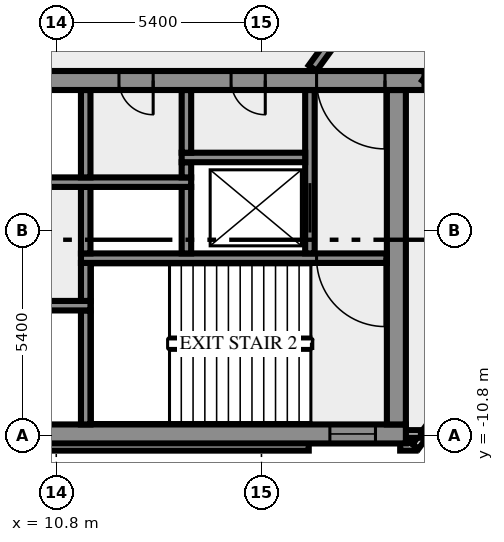
"""IFC4 building model, lengths in metres.
Left out: names, types, materials, properties, quantities, classifications, styles, units other than length and angle.
Written with IfcOpenShell. Run it as: python <this file> out.ifc"""

import sys

from ifc_helpers import new_model, si_unit, direction, frame, frame_2d, origin, place, context, subcontext, project, spatial, rectangle, extrude, element, fill, save


model = new_model("IFC4")
c1 = context("Model", 3, precision=1e-05, world=origin(), true_north=direction((0.0, 1.0)))
c2 = subcontext(c1, "Body", "Model", "MODEL_VIEW")
j1 = project(units=[si_unit("LENGTHUNIT", "METRE"), si_unit("PLANEANGLEUNIT", "RADIAN")], contexts=[c1])
p1 = place(None, origin())
s1 = spatial("IfcSite", under=j1, at=p1, CompositionType="ELEMENT")
p2 = place(p1, origin())
s2 = spatial("IfcBuilding", under=s1, at=p2, CompositionType="ELEMENT")
p3 = place(p2, frame((0.0, 0.0, 109.0)))
s3 = spatial("IfcBuildingStorey", under=s2, at=p3, CompositionType="ELEMENT", Elevation=109.0)
p4 = place(p3, frame((-17.444, -11.088, 0.0), z_axis=(0.0, 0.0, 1.0), x_axis=(1.0, 0.0, 0.0)))
e1 = element("IfcWall", 1, at=p4, inside=s3, PredefinedType="SOLIDWALL", context=c2, shape_type="SweptSolid", body=[
    extrude(rectangle(XDim=34.888, YDim=0.2, at=frame_2d((17.444, 0.0))), origin(), (0.0, 0.0, 1.0), 3.65),
])
p5 = place(p3, frame((19.85, -11.088, 0.0), z_axis=(0.0, 0.0, 1.0), x_axis=(1.0, 0.0, 0.0)))
e2 = element("IfcWall", 2, at=p5, inside=s3, PredefinedType="SOLIDWALL", context=c2, shape_type="SweptSolid", body=[
    extrude(rectangle(XDim=0.406, YDim=0.2, at=frame_2d((0.203, 0.0))), origin(), (0.0, 0.0, 1.0), 3.65),
])
p6 = place(p3, frame((20.253, -11.083, 0.0), z_axis=(0.0, 0.0, 1.0), x_axis=(0.587766567315, 0.809030569476, 0.0)))
e3 = element("IfcWall", 3, at=p6, inside=s3, PredefinedType="SOLIDWALL", context=c2, shape_type="SweptSolid", body=[
    extrude(rectangle(XDim=2.688, YDim=0.2, at=frame_2d((1.344, 0.0))), origin(), (0.0, 0.0, 1.0), 3.65),
])
p7 = place(p3, frame((19.98, -10.75, 0.0), z_axis=(0.0, 0.0, 1.0), x_axis=(1.0, 0.0, 0.0)))
e4 = element("IfcWall", 4, at=p7, inside=s3, PredefinedType="SOLIDWALL", context=c2, shape_type="SweptSolid", body=[
    extrude(rectangle(XDim=0.417, YDim=0.2, at=frame_2d((0.208, 0.0))), origin(), (0.0, 0.0, 1.0), 3.65),
])
p8 = place(p3, frame((-20.0, -10.75, 0.0), z_axis=(0.0, 0.0, 1.0), x_axis=(1.0, 0.0, 0.0)))
e5 = element("IfcWall", 5, at=p8, inside=s3, PredefinedType="SHEAR", context=c2, shape_type="SweptSolid", body=[
    extrude(rectangle(XDim=40.0, YDim=0.5, at=frame_2d((20.0, 0.0))), origin(), (0.0, 0.0, 1.0), 3.65),
])
p9 = place(p8, frame((0.8, 0.0, 1.0)))
e6 = element("IfcOpeningElement", 6, at=p9, cuts=e5, PredefinedType="OPENING", context=c2, shape_type="SweptSolid", body=[
    extrude(rectangle(XDim=1.2, YDim=1.2, at=frame_2d((0.6, 0.6))), frame((0.0, 0.26, 0.0), z_axis=(0.0, -1.0, 0.0), x_axis=(1.0, 0.0, 0.0)), (0.0, 0.0, 1.0), 0.52),
])
p10 = place(p8, frame((38.0, 0.0, 1.0)))
e7 = element("IfcOpeningElement", 7, at=p10, cuts=e5, PredefinedType="OPENING", context=c2, shape_type="SweptSolid", body=[
    extrude(rectangle(XDim=1.2, YDim=1.2, at=frame_2d((0.6, 0.6))), frame((0.0, 0.26, 0.0), z_axis=(0.0, -1.0, 0.0), x_axis=(1.0, 0.0, 0.0)), (0.0, 0.0, 1.0), 0.52),
])
p11 = place(p3, frame((11.575, -10.5, 0.0), z_axis=(0.0, 0.0, 1.0), x_axis=(0.0, 1.0, 0.0)))
e8 = element("IfcWall", 8, at=p11, inside=s3, PredefinedType="SHEAR", context=c2, shape_type="SweptSolid", body=[
    extrude(rectangle(XDim=3.0, YDim=0.25, at=frame_2d((1.5, 0.0))), origin(), (0.0, 0.0, 1.0), 3.65),
])
p12 = place(p3, frame((19.75, -10.5, 0.0), z_axis=(0.0, 0.0, 1.0), x_axis=(0.0, 1.0, 0.0)))
e9 = element("IfcWall", 9, at=p12, inside=s3, PredefinedType="SHEAR", context=c2, shape_type="SweptSolid", body=[
    extrude(rectangle(XDim=8.8, YDim=0.5, at=frame_2d((4.4, 0.0))), origin(), (0.0, 0.0, 1.0), 3.65),
])
p13 = place(p3, frame((11.7, -7.375, 0.0), z_axis=(0.0, 0.0, 1.0), x_axis=(-1.0, 0.0, 0.0)))
e10 = element("IfcWall", 10, at=p13, inside=s3, PredefinedType="SHEAR", context=c2, shape_type="SweptSolid", body=[
    extrude(rectangle(XDim=23.4, YDim=0.25, at=frame_2d((11.7, 0.0))), origin(), (0.0, 0.0, 1.0), 3.65),
])
p14 = place(p13, frame((21.45, 0.0, 0.0)))
e11 = element("IfcOpeningElement", 11, at=p14, cuts=e10, PredefinedType="OPENING", context=c2, shape_type="SweptSolid", body=[
    extrude(rectangle(XDim=1.1, YDim=2.1, at=frame_2d((0.55, 1.05))), frame((0.0, 0.135, 0.0), z_axis=(0.0, -1.0, 0.0), x_axis=(1.0, 0.0, 0.0)), (0.0, 0.0, 1.0), 0.27),
])
p15 = place(p13, frame((18.95, 0.0, 0.0)))
e12 = element("IfcOpeningElement", 12, at=p15, cuts=e10, PredefinedType="OPENING", context=c2, shape_type="SweptSolid", body=[
    extrude(rectangle(XDim=1.1, YDim=2.1, at=frame_2d((0.55, 1.05))), frame((0.0, 0.135, 0.0), z_axis=(0.0, -1.0, 0.0), x_axis=(1.0, 0.0, 0.0)), (0.0, 0.0, 1.0), 0.27),
])
p16 = place(p13, frame((16.45, 0.0, 0.0)))
e13 = element("IfcOpeningElement", 13, at=p16, cuts=e10, PredefinedType="OPENING", context=c2, shape_type="SweptSolid", body=[
    extrude(rectangle(XDim=1.1, YDim=2.1, at=frame_2d((0.55, 1.05))), frame((0.0, 0.135, 0.0), z_axis=(0.0, -1.0, 0.0), x_axis=(1.0, 0.0, 0.0)), (0.0, 0.0, 1.0), 0.27),
])
p17 = place(p13, frame((13.875, 0.0, 0.0)))
e14 = element("IfcOpeningElement", 14, at=p17, cuts=e10, PredefinedType="OPENING", context=c2, shape_type="SweptSolid", body=[
    extrude(rectangle(XDim=0.9, YDim=2.1, at=frame_2d((0.45, 1.05))), frame((0.0, 0.135, 0.0), z_axis=(0.0, -1.0, 0.0), x_axis=(1.0, 0.0, 0.0)), (0.0, 0.0, 1.0), 0.27),
])
p18 = place(p13, frame((11.1, 0.0, 0.0)))
e15 = element("IfcOpeningElement", 15, at=p18, cuts=e10, PredefinedType="OPENING", context=c2, shape_type="SweptSolid", body=[
    extrude(rectangle(XDim=0.9, YDim=2.1, at=frame_2d((0.45, 1.05))), frame((0.0, 0.135, 0.0), z_axis=(0.0, -1.0, 0.0), x_axis=(1.0, 0.0, 0.0)), (0.0, 0.0, 1.0), 0.27),
])
p19 = place(p3, frame((11.575, -7.25, 0.0), z_axis=(0.0, 0.0, 1.0), x_axis=(0.0, 1.0, 0.0)))
e16 = element("IfcWall", 16, at=p19, inside=s3, PredefinedType="SHEAR", context=c2, shape_type="SweptSolid", body=[
    extrude(rectangle(XDim=1.0, YDim=0.25, at=frame_2d((0.5, 0.0))), origin(), (0.0, 0.0, 1.0), 3.65),
])
p20 = place(p3, frame((19.5, -6.125, 0.0), z_axis=(0.0, 0.0, 1.0), x_axis=(-1.0, 0.0, 0.0)))
e17 = element("IfcWall", 17, at=p20, inside=s3, PredefinedType="SHEAR", context=c2, shape_type="SweptSolid", body=[
    extrude(rectangle(XDim=8.05, YDim=0.25, at=frame_2d((4.025, 0.0))), origin(), (0.0, 0.0, 1.0), 3.65),
])
p21 = place(p20, frame((0.05, 0.0, 0.0)))
e18 = element("IfcOpeningElement", 18, at=p21, cuts=e17, PredefinedType="OPENING", context=c2, shape_type="SweptSolid", body=[
    extrude(rectangle(XDim=1.8, YDim=2.1, at=frame_2d((0.9, 1.05))), frame((0.0, 0.135, 0.0), z_axis=(0.0, -1.0, 0.0), x_axis=(1.0, 0.0, 0.0)), (0.0, 0.0, 1.0), 0.27),
])
for number, where, z_axis, x_axis in (
    (19, (11.575, -6.0, 0.0), (0.0, 0.0, 1.0), (0.0, 1.0, 0.0)),
    (20, (14.225, -6.0, 0.0), (0.0, 0.0, 1.0), (0.0, 1.0, 0.0)),
):
    element("IfcWall", number, at=place(p3, frame(where, z_axis=z_axis, x_axis=x_axis)), inside=s3, PredefinedType="SHEAR", context=c2, shape_type="SweptSolid", body=[
        extrude(rectangle(XDim=1.75, YDim=0.25, at=frame_2d((0.875, 0.0))), origin(), (0.0, 0.0, 1.0), 3.65),
    ])
p22 = place(p3, frame((17.475, -6.0, 0.0), z_axis=(0.0, 0.0, 1.0), x_axis=(0.0, 1.0, 0.0)))
e21 = element("IfcWall", 21, at=p22, inside=s3, PredefinedType="SHEAR", context=c2, shape_type="SweptSolid", body=[
    extrude(rectangle(XDim=4.3, YDim=0.25, at=frame_2d((2.15, 0.0))), origin(), (0.0, 0.0, 1.0), 3.65),
])
p23 = place(p22, frame((0.55, 0.0, 0.0)))
e22 = element("IfcOpeningElement", 22, at=p23, cuts=e21, PredefinedType="OPENING", context=c2, shape_type="SweptSolid", body=[
    extrude(rectangle(XDim=1.3, YDim=2.1, at=frame_2d((0.65, 1.05))), frame((0.0, 0.135, 0.0), z_axis=(0.0, -1.0, 0.0), x_axis=(1.0, 0.0, 0.0)), (0.0, 0.0, 1.0), 0.27),
])
p24 = place(p3, frame((-0.6, -4.125, 0.0), z_axis=(0.0, 0.0, 1.0), x_axis=(1.0, 0.0, 0.0)))
e23 = element("IfcWall", 23, at=p24, inside=s3, PredefinedType="SHEAR", context=c2, shape_type="SweptSolid", body=[
    extrude(rectangle(XDim=14.95, YDim=0.25, at=frame_2d((7.475, 0.0))), origin(), (0.0, 0.0, 1.0), 3.65),
])
p25 = place(p24, frame((2.75, 0.0, 0.0)))
e24 = element("IfcOpeningElement", 24, at=p25, cuts=e23, PredefinedType="OPENING", context=c2, shape_type="SweptSolid", body=[
    extrude(rectangle(XDim=1.3, YDim=2.1, at=frame_2d((0.65, 1.05))), frame((0.0, 0.135, 0.0), z_axis=(0.0, -1.0, 0.0), x_axis=(1.0, 0.0, 0.0)), (0.0, 0.0, 1.0), 0.27),
])
p26 = place(p3, frame((11.575, -4.0, 0.0), z_axis=(0.0, 0.0, 1.0), x_axis=(0.0, 1.0, 0.0)))
e25 = element("IfcWall", 25, at=p26, inside=s3, PredefinedType="SHEAR", context=c2, shape_type="SweptSolid", body=[
    extrude(rectangle(XDim=2.3, YDim=0.25, at=frame_2d((1.15, 0.0))), origin(), (0.0, 0.0, 1.0), 3.65),
])
p27 = place(p3, frame((14.225, -4.0, 0.0), z_axis=(0.0, 0.0, 1.0), x_axis=(0.0, 1.0, 0.0)))
e26 = element("IfcWall", 26, at=p27, inside=s3, PredefinedType="SHEAR", context=c2, shape_type="SweptSolid", body=[
    extrude(rectangle(XDim=0.4, YDim=0.25, at=frame_2d((0.2, 0.0))), origin(), (0.0, 0.0, 1.0), 3.65),
])
p28 = place(p3, frame((14.1, -3.475, 0.0), z_axis=(0.0, 0.0, 1.0), x_axis=(1.0, 0.0, 0.0)))
e27 = element("IfcWall", 27, at=p28, inside=s3, PredefinedType="SHEAR", context=c2, shape_type="SweptSolid", body=[
    extrude(rectangle(XDim=3.25, YDim=0.25, at=frame_2d((1.625, 0.0))), origin(), (0.0, 0.0, 1.0), 3.65),
])
p29 = place(p3, frame((14.225, -3.35, 0.0), z_axis=(0.0, 0.0, 1.0), x_axis=(0.0, 1.0, 0.0)))
e28 = element("IfcWall", 28, at=p29, inside=s3, PredefinedType="SHEAR", context=c2, shape_type="SweptSolid", body=[
    extrude(rectangle(XDim=1.65, YDim=0.25, at=frame_2d((0.825, 0.0))), origin(), (0.0, 0.0, 1.0), 3.65),
])
p30 = place(p3, frame((20.49, -1.45, 0.0), z_axis=(0.0, 0.0, 1.0), x_axis=(-1.0, 0.0, 0.0)))
e29 = element("IfcWall", 29, at=p30, inside=s3, PredefinedType="SHEAR", context=c2, shape_type="SweptSolid", body=[
    extrude(rectangle(XDim=40.98, YDim=0.5, at=frame_2d((20.49, 0.0))), origin(), (0.0, 0.0, 1.0), 3.65),
])
p31 = place(p30, frame((38.14, 0.0, 0.0)))
e30 = element("IfcOpeningElement", 30, at=p31, cuts=e29, PredefinedType="OPENING", context=c2, shape_type="SweptSolid", body=[
    extrude(rectangle(XDim=1.8, YDim=2.1, at=frame_2d((0.9, 1.05))), frame((0.0, 0.26, 0.0), z_axis=(0.0, -1.0, 0.0), x_axis=(1.0, 0.0, 0.0)), (0.0, 0.0, 1.0), 0.52),
])
p32 = place(p30, frame((36.728, 0.0, 0.0)))
e31 = element("IfcOpeningElement", 31, at=p32, cuts=e29, PredefinedType="OPENING", context=c2, shape_type="SweptSolid", body=[
    extrude(rectangle(XDim=0.8, YDim=2.1, at=frame_2d((0.4, 1.05))), frame((0.0, 0.26, 0.0), z_axis=(0.0, -1.0, 0.0), x_axis=(1.0, 0.0, 0.0)), (0.0, 0.0, 1.0), 0.52),
])
p33 = place(p30, frame((35.153, 0.0, 0.0)))
e32 = element("IfcOpeningElement", 32, at=p33, cuts=e29, PredefinedType="OPENING", context=c2, shape_type="SweptSolid", body=[
    extrude(rectangle(XDim=0.8, YDim=2.1, at=frame_2d((0.4, 1.05))), frame((0.0, 0.26, 0.0), z_axis=(0.0, -1.0, 0.0), x_axis=(1.0, 0.0, 0.0)), (0.0, 0.0, 1.0), 0.52),
])
p34 = place(p30, frame((32.94, 0.0, 0.0)))
e33 = element("IfcOpeningElement", 33, at=p34, cuts=e29, PredefinedType="OPENING", context=c2, shape_type="SweptSolid", body=[
    extrude(rectangle(XDim=0.9, YDim=2.1, at=frame_2d((0.45, 1.05))), frame((0.0, 0.26, 0.0), z_axis=(0.0, -1.0, 0.0), x_axis=(1.0, 0.0, 0.0)), (0.0, 0.0, 1.0), 0.52),
])
p35 = place(p30, frame((21.765, 0.0, 0.0)))
e34 = element("IfcOpeningElement", 34, at=p35, cuts=e29, PredefinedType="OPENING", context=c2, shape_type="SweptSolid", body=[
    extrude(rectangle(XDim=2.0, YDim=2.1, at=frame_2d((1.0, 1.05))), frame((0.0, 0.26, 0.0), z_axis=(0.0, -1.0, 0.0), x_axis=(1.0, 0.0, 0.0)), (0.0, 0.0, 1.0), 0.52),
])
p36 = place(p30, frame((7.14, 0.0, 0.0)))
e35 = element("IfcOpeningElement", 35, at=p36, cuts=e29, PredefinedType="OPENING", context=c2, shape_type="SweptSolid", body=[
    extrude(rectangle(XDim=0.9, YDim=2.1, at=frame_2d((0.45, 1.05))), frame((0.0, 0.26, 0.0), z_axis=(0.0, -1.0, 0.0), x_axis=(1.0, 0.0, 0.0)), (0.0, 0.0, 1.0), 0.52),
])
p37 = place(p30, frame((4.19, 0.0, 0.0)))
e36 = element("IfcOpeningElement", 36, at=p37, cuts=e29, PredefinedType="OPENING", context=c2, shape_type="SweptSolid", body=[
    extrude(rectangle(XDim=0.9, YDim=2.1, at=frame_2d((0.45, 1.05))), frame((0.0, 0.26, 0.0), z_axis=(0.0, -1.0, 0.0), x_axis=(1.0, 0.0, 0.0)), (0.0, 0.0, 1.0), 0.52),
])
p38 = place(p30, frame((1.04, 0.0, 0.0)))
e37 = element("IfcOpeningElement", 37, at=p38, cuts=e29, PredefinedType="OPENING", context=c2, shape_type="SweptSolid", body=[
    extrude(rectangle(XDim=1.8, YDim=2.1, at=frame_2d((0.9, 1.05))), frame((0.0, 0.26, 0.0), z_axis=(0.0, -1.0, 0.0), x_axis=(1.0, 0.0, 0.0)), (0.0, 0.0, 1.0), 0.52),
])
p39 = place(p3, frame((40.463, 25.911, 0.0), z_axis=(0.0, 0.0, 1.0), x_axis=(-0.587781654618, -0.809019608226, 0.0)))
e38 = element("IfcWall", 38, at=p39, inside=s3, PredefinedType="SOLIDWALL", context=c2, shape_type="SweptSolid", body=[
    extrude(rectangle(XDim=33.911, YDim=0.25, at=frame_2d((16.956, 0.0))), origin(), (0.0, 0.0, 1.0), 3.65),
])
p40 = place(p39, frame((21.396, 0.0, 0.0)))
e39 = element("IfcOpeningElement", 39, at=p40, cuts=e38, PredefinedType="OPENING", context=c2, shape_type="SweptSolid", body=[
    extrude(rectangle(XDim=0.9, YDim=2.1, at=frame_2d((0.45, 1.05))), frame((0.0, 0.135, 0.0), z_axis=(0.0, -1.0, 0.0), x_axis=(1.0, 0.0, 0.0)), (0.0, 0.0, 1.0), 0.27),
])
p41 = place(p39, frame((19.795, 0.0, 0.0)))
e40 = element("IfcOpeningElement", 40, at=p41, cuts=e38, PredefinedType="OPENING", context=c2, shape_type="SweptSolid", body=[
    extrude(rectangle(XDim=0.9, YDim=2.1, at=frame_2d((0.45, 1.05))), frame((0.0, 0.135, 0.0), z_axis=(0.0, -1.0, 0.0), x_axis=(1.0, 0.0, 0.0)), (0.0, 0.0, 1.0), 0.27),
])
p42 = place(p3, frame((17.545, -1.125, 0.0), z_axis=(0.0, 0.0, 1.0), x_axis=(0.587788021768, 0.809014982226, 0.0)))
e41 = element("IfcWall", 41, at=p42, inside=s3, PredefinedType="SOLIDWALL", context=c2, shape_type="SweptSolid", body=[
    extrude(rectangle(XDim=35.344, YDim=0.25, at=frame_2d((17.672, 0.0))), origin(), (0.0, 0.0, 1.0), 3.65),
])
p43 = place(p42, frame((17.508, 0.0, 0.0)))
e42 = element("IfcOpeningElement", 42, at=p43, cuts=e41, PredefinedType="OPENING", context=c2, shape_type="SweptSolid", body=[
    extrude(rectangle(XDim=0.9, YDim=2.1, at=frame_2d((0.45, 1.05))), frame((0.0, 0.135, 0.0), z_axis=(0.0, -1.0, 0.0), x_axis=(1.0, 0.0, 0.0)), (0.0, 0.0, 1.0), 0.27),
])
p44 = place(p42, frame((21.808, 0.0, 0.0)))
e43 = element("IfcOpeningElement", 43, at=p44, cuts=e41, PredefinedType="OPENING", context=c2, shape_type="SweptSolid", body=[
    extrude(rectangle(XDim=0.9, YDim=2.1, at=frame_2d((0.45, 1.05))), frame((0.0, 0.135, 0.0), z_axis=(0.0, -1.0, 0.0), x_axis=(1.0, 0.0, 0.0)), (0.0, 0.0, 1.0), 0.27),
])
p45 = place(p42, frame((19.108, 0.0, 0.0)))
e44 = element("IfcOpeningElement", 44, at=p45, cuts=e41, PredefinedType="OPENING", context=c2, shape_type="SweptSolid", body=[
    extrude(rectangle(XDim=0.9, YDim=2.1, at=frame_2d((0.45, 1.05))), frame((0.0, 0.135, 0.0), z_axis=(0.0, -1.0, 0.0), x_axis=(1.0, 0.0, 0.0)), (0.0, 0.0, 1.0), 0.27),
])
p46 = place(p10, origin())
e45 = element("IfcWindow", 45, at=p46, inside=s3, PartitioningType="SINGLE_PANEL", PredefinedType="WINDOW", context=c2, shape_type="SweptSolid", body=[
    extrude(rectangle(XDim=1.2, YDim=1.2, at=frame_2d((0.6, 0.6))), frame((0.0, 0.03, 0.0), z_axis=(0.0, -1.0, 0.0), x_axis=(1.0, 0.0, 0.0)), (0.0, 0.0, 1.0), 0.06),
])
fill(e7, e45)
p47 = place(p21, origin())
e46 = element("IfcDoor", 46, at=p47, inside=s3, OperationType="DOUBLE_DOOR_SINGLE_SWING", PredefinedType="DOOR", context=c2, shape_type="SweptSolid", body=[
    extrude(rectangle(XDim=1.8, YDim=2.1, at=frame_2d((0.9, 1.05))), frame((0.0, 0.025, 0.0), z_axis=(0.0, -1.0, 0.0), x_axis=(1.0, 0.0, 0.0)), (0.0, 0.0, 1.0), 0.05),
])
fill(e18, e46)
p48 = place(p23, origin())
e47 = element("IfcDoor", 47, at=p48, inside=s3, OperationType="DOUBLE_DOOR_SLIDING", PredefinedType="DOOR", context=c2, shape_type="SweptSolid", body=[
    extrude(rectangle(XDim=1.3, YDim=2.1, at=frame_2d((0.65, 1.05))), frame((0.0, 0.025, 0.0), z_axis=(0.0, -1.0, 0.0), x_axis=(1.0, 0.0, 0.0)), (0.0, 0.0, 1.0), 0.05),
])
fill(e22, e47)
p49 = place(p36, origin())
e48 = element("IfcDoor", 48, at=p49, inside=s3, OperationType="SINGLE_SWING_LEFT", PredefinedType="DOOR", context=c2, shape_type="SweptSolid", body=[
    extrude(rectangle(XDim=0.9, YDim=2.1, at=frame_2d((0.45, 1.05))), frame((0.0, 0.025, 0.0), z_axis=(0.0, -1.0, 0.0), x_axis=(1.0, 0.0, 0.0)), (0.0, 0.0, 1.0), 0.05),
])
fill(e35, e48)
p50 = place(p37, origin())
e49 = element("IfcDoor", 49, at=p50, inside=s3, OperationType="SINGLE_SWING_LEFT", PredefinedType="DOOR", context=c2, shape_type="SweptSolid", body=[
    extrude(rectangle(XDim=0.9, YDim=2.1, at=frame_2d((0.45, 1.05))), frame((0.0, 0.025, 0.0), z_axis=(0.0, -1.0, 0.0), x_axis=(1.0, 0.0, 0.0)), (0.0, 0.0, 1.0), 0.05),
])
fill(e36, e49)
p51 = place(p38, origin())
e50 = element("IfcDoor", 50, at=p51, inside=s3, OperationType="DOUBLE_DOOR_SINGLE_SWING", PredefinedType="DOOR", context=c2, shape_type="SweptSolid", body=[
    extrude(rectangle(XDim=1.8, YDim=2.1, at=frame_2d((0.9, 1.05))), frame((0.0, 0.025, 0.0), z_axis=(0.0, -1.0, 0.0), x_axis=(1.0, 0.0, 0.0)), (0.0, 0.0, 1.0), 0.05),
])
fill(e37, e50)
save(model, sys.argv[1])
